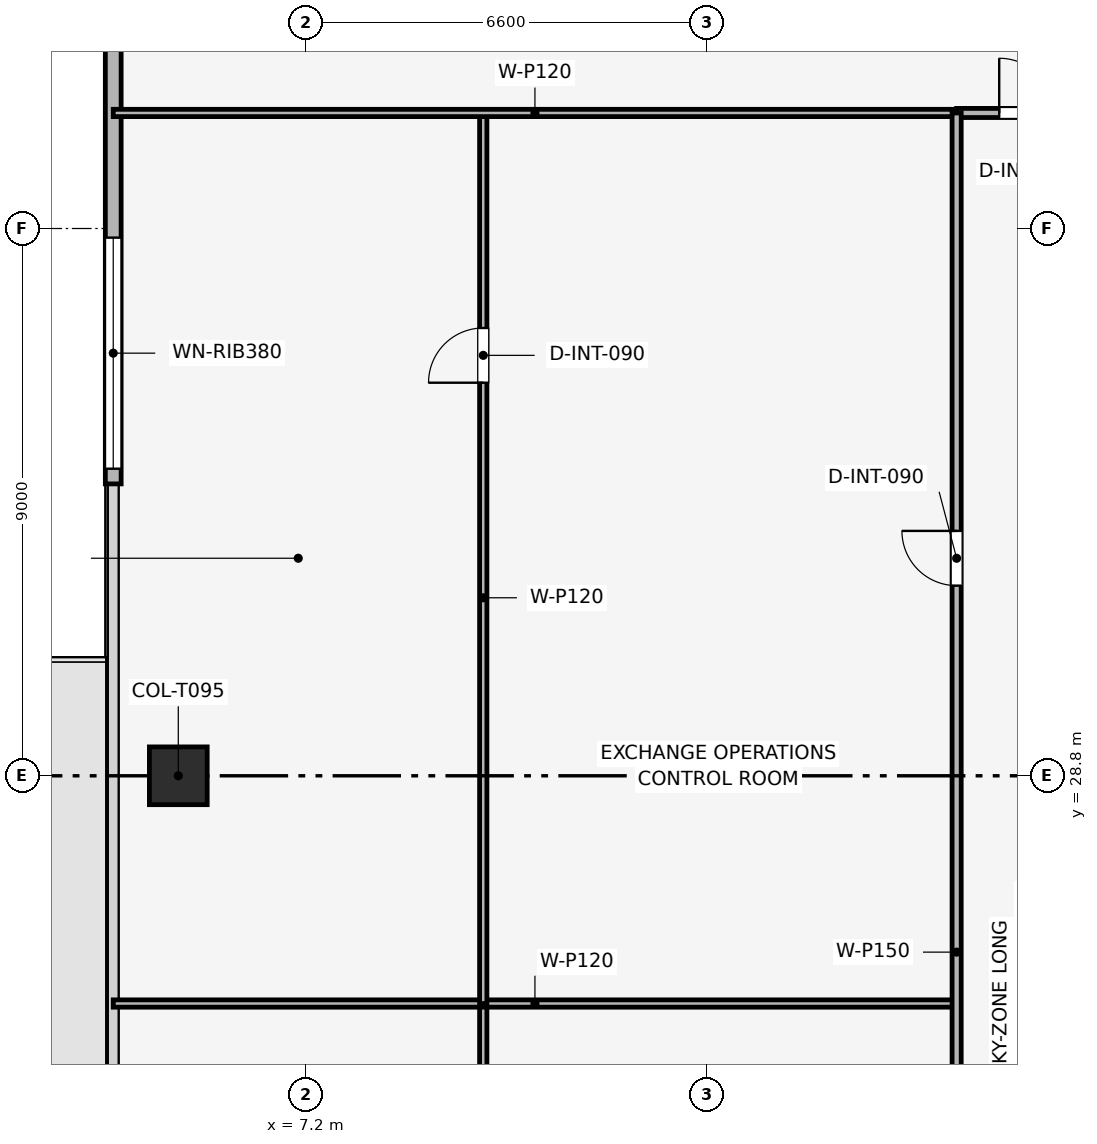
"""IFC4 building model, lengths in metres.
Left out: names, types, materials, properties, quantities, classifications, styles, units other than length and angle.
Written with IfcOpenShell. Run it as: python <this file> out.ifc"""

import sys

from ifc_helpers import new_model, si_unit, direction, frame, frame_2d, origin, origin_2d, place, context, subcontext, project, spatial, rectangle, extrude, element, fill, save


model = new_model("IFC4")
c1 = context("Model", 3, precision=1e-05, world=origin(), true_north=direction((0.0, 1.0)))
c2 = subcontext(c1, "Body", "Model", "MODEL_VIEW")
j1 = project(units=[si_unit("LENGTHUNIT", "METRE"), si_unit("PLANEANGLEUNIT", "RADIAN")], contexts=[c1])
p1 = place(None, origin())
s1 = spatial("IfcSite", under=j1, at=p1, CompositionType="ELEMENT")
p2 = place(p1, origin())
s2 = spatial("IfcBuilding", under=s1, at=p2, CompositionType="ELEMENT")
p3 = place(p2, frame((0.0, 0.0, 269.1)))
s3 = spatial("IfcBuildingStorey", under=s2, at=p3, CompositionType="ELEMENT", Elevation=269.1)
p4 = place(p3, frame((5.1, 28.8, 0.003), z_axis=(0.0, 0.0, 1.0), x_axis=(1.0, 0.0, 0.0)))
e1 = element("IfcColumn", 1, at=p4, inside=s3, PredefinedType="COLUMN", context=c2, shape_type="SweptSolid", body=[
    extrude(rectangle(XDim=0.95, YDim=0.95, at=origin_2d()), origin(), (0.0, 0.0, 1.0), 3.494),
])
p5 = place(p3, frame((4.03, 33.6, 0.0), z_axis=(0.0, 0.0, 1.0), x_axis=(0.0, 1.0, 0.0)))
e2 = element("IfcWall", 2, at=p5, inside=s3, PredefinedType="SOLIDWALL", context=c2, shape_type="SweptSolid", body=[
    extrude(rectangle(XDim=13.2, YDim=0.26, at=frame_2d((6.6, 0.0))), origin(), (0.0, 0.0, 1.0), 3.5),
])
p6 = place(p5, frame((0.25, 0.0, 0.9)))
e3 = element("IfcOpeningElement", 3, at=p6, cuts=e2, PredefinedType="OPENING", context=c2, shape_type="SweptSolid", body=[
    extrude(rectangle(XDim=3.8, YDim=1.9, at=frame_2d((1.9, 0.95))), frame((0.0, 0.14, 0.0), z_axis=(0.0, -1.0, 0.0), x_axis=(1.0, 0.0, 0.0)), (0.0, 0.0, 1.0), 0.28),
])
p7 = place(p3, frame((10.115, 13.1, 0.0), z_axis=(0.0, 0.0, 1.0), x_axis=(0.0, 1.0, 0.0)))
e4 = element("IfcWall", 4, at=p7, inside=s3, PredefinedType="PARTITIONING", context=c2, shape_type="SweptSolid", body=[
    extrude(rectangle(XDim=11.955, YDim=0.12, at=frame_2d((5.978, 0.0))), origin(), (0.0, 0.0, 1.0), 3.085),
])
p8 = place(p7, frame((8.191, 0.0, 0.0)))
e5 = element("IfcOpeningElement", 5, at=p8, cuts=e4, PredefinedType="OPENING", context=c2, shape_type="SweptSolid", body=[
    extrude(rectangle(XDim=0.9, YDim=2.1, at=frame_2d((0.45, 1.05))), frame((0.0, 0.07, 0.0), z_axis=(0.0, -1.0, 0.0), x_axis=(1.0, 0.0, 0.0)), (0.0, 0.0, 1.0), 0.14),
])
p9 = place(p3, frame((4.03, 25.055, 0.0), z_axis=(0.0, 0.0, 1.0), x_axis=(1.0, 0.0, 0.0)))
e6 = element("IfcWall", 6, at=p9, inside=s3, PredefinedType="PARTITIONING", context=c2, shape_type="SweptSolid", body=[
    extrude(rectangle(XDim=13.87, YDim=0.12, at=frame_2d((6.935, 0.0))), origin(), (0.0, 0.0, 1.0), 3.085),
])
p10 = place(p3, frame((10.115, 25.055, 0.0), z_axis=(0.0, 0.0, 1.0), x_axis=(0.0, 1.0, 0.0)))
e7 = element("IfcWall", 7, at=p10, inside=s3, PredefinedType="PARTITIONING", context=c2, shape_type="SweptSolid", body=[
    extrude(rectangle(XDim=14.645, YDim=0.12, at=frame_2d((7.323, 0.0))), origin(), (0.0, 0.0, 1.0), 3.085),
])
p11 = place(p10, frame((10.209, 0.0, 0.0)))
e8 = element("IfcOpeningElement", 8, at=p11, cuts=e7, PredefinedType="OPENING", context=c2, shape_type="SweptSolid", body=[
    extrude(rectangle(XDim=0.9, YDim=2.1, at=frame_2d((0.45, 1.05))), frame((0.0, 0.07, 0.0), z_axis=(0.0, -1.0, 0.0), x_axis=(1.0, 0.0, 0.0)), (0.0, 0.0, 1.0), 0.14),
])
p12 = place(p3, frame((4.03, 39.7, 0.0), z_axis=(0.0, 0.0, 1.0), x_axis=(1.0, 0.0, 0.0)))
e9 = element("IfcWall", 9, at=p12, inside=s3, PredefinedType="PARTITIONING", context=c2, shape_type="SweptSolid", body=[
    extrude(rectangle(XDim=13.87, YDim=0.12, at=frame_2d((6.935, 0.0))), origin(), (0.0, 0.0, 1.0), 3.085),
])
p13 = place(p3, frame((17.9, 39.7, 0.0), z_axis=(0.0, 0.0, 1.0), x_axis=(1.0, 0.0, 0.0)))
e10 = element("IfcWall", 10, at=p13, inside=s3, PredefinedType="PARTITIONING", context=c2, shape_type="SweptSolid", body=[
    extrude(rectangle(XDim=21.8, YDim=0.15, at=frame_2d((10.9, 0.0))), origin(), (0.0, 0.0, 1.0), 3.085),
])
p14 = place(p13, frame((0.7, 0.0, 0.0)))
e11 = element("IfcOpeningElement", 11, at=p14, cuts=e10, PredefinedType="OPENING", context=c2, shape_type="SweptSolid", body=[
    extrude(rectangle(XDim=0.9, YDim=2.1, at=frame_2d((0.45, 1.05))), frame((0.0, 0.085, 0.0), z_axis=(0.0, -1.0, 0.0), x_axis=(1.0, 0.0, 0.0)), (0.0, 0.0, 1.0), 0.17),
])
p15 = place(p13, frame((4.801, 0.0, 0.0)))
e12 = element("IfcOpeningElement", 12, at=p15, cuts=e10, PredefinedType="OPENING", context=c2, shape_type="SweptSolid", body=[
    extrude(rectangle(XDim=0.9, YDim=2.1, at=frame_2d((0.45, 1.05))), frame((0.0, 0.085, 0.0), z_axis=(0.0, -1.0, 0.0), x_axis=(1.0, 0.0, 0.0)), (0.0, 0.0, 1.0), 0.17),
])
p16 = place(p13, frame((10.535, 0.0, 0.0)))
e13 = element("IfcOpeningElement", 13, at=p16, cuts=e10, PredefinedType="OPENING", context=c2, shape_type="SweptSolid", body=[
    extrude(rectangle(XDim=0.9, YDim=2.1, at=frame_2d((0.45, 1.05))), frame((0.0, 0.085, 0.0), z_axis=(0.0, -1.0, 0.0), x_axis=(1.0, 0.0, 0.0)), (0.0, 0.0, 1.0), 0.17),
])
p17 = place(p13, frame((17.334, 0.0, 0.0)))
e14 = element("IfcOpeningElement", 14, at=p17, cuts=e10, PredefinedType="OPENING", context=c2, shape_type="SweptSolid", body=[
    extrude(rectangle(XDim=0.9, YDim=2.1, at=frame_2d((0.45, 1.05))), frame((0.0, 0.085, 0.0), z_axis=(0.0, -1.0, 0.0), x_axis=(1.0, 0.0, 0.0)), (0.0, 0.0, 1.0), 0.17),
])
p18 = place(p3, frame((17.9, 10.8, 0.0), z_axis=(0.0, 0.0, 1.0), x_axis=(0.0, 1.0, 0.0)))
e15 = element("IfcWall", 15, at=p18, inside=s3, PredefinedType="PARTITIONING", context=c2, shape_type="SweptSolid", body=[
    extrude(rectangle(XDim=28.9, YDim=0.15, at=frame_2d((14.45, 0.0))), origin(), (0.0, 0.0, 1.0), 3.085),
])
p19 = place(p18, frame((0.7, 0.0, 0.0)))
e16 = element("IfcOpeningElement", 16, at=p19, cuts=e15, PredefinedType="OPENING", context=c2, shape_type="SweptSolid", body=[
    extrude(rectangle(XDim=0.9, YDim=2.1, at=frame_2d((0.45, 1.05))), frame((0.0, 0.085, 0.0), z_axis=(0.0, -1.0, 0.0), x_axis=(1.0, 0.0, 0.0)), (0.0, 0.0, 1.0), 0.17),
])
p20 = place(p18, frame((7.828, 0.0, 0.0)))
e17 = element("IfcOpeningElement", 17, at=p20, cuts=e15, PredefinedType="OPENING", context=c2, shape_type="SweptSolid", body=[
    extrude(rectangle(XDim=0.9, YDim=2.1, at=frame_2d((0.45, 1.05))), frame((0.0, 0.085, 0.0), z_axis=(0.0, -1.0, 0.0), x_axis=(1.0, 0.0, 0.0)), (0.0, 0.0, 1.0), 0.17),
])
p21 = place(p18, frame((21.127, 0.0, 0.0)))
e18 = element("IfcOpeningElement", 18, at=p21, cuts=e15, PredefinedType="OPENING", context=c2, shape_type="SweptSolid", body=[
    extrude(rectangle(XDim=0.9, YDim=2.1, at=frame_2d((0.45, 1.05))), frame((0.0, 0.085, 0.0), z_axis=(0.0, -1.0, 0.0), x_axis=(1.0, 0.0, 0.0)), (0.0, 0.0, 1.0), 0.17),
])
p22 = place(p6, origin())
e19 = element("IfcWindow", 19, at=p22, inside=s3, PartitioningType="SINGLE_PANEL", PredefinedType="WINDOW", context=c2, shape_type="SweptSolid", body=[
    extrude(rectangle(XDim=3.8, YDim=1.9, at=frame_2d((1.9, 0.95))), frame((0.0, 0.03, 0.0), z_axis=(0.0, -1.0, 0.0), x_axis=(1.0, 0.0, 0.0)), (0.0, 0.0, 1.0), 0.06),
])
fill(e3, e19)
p23 = place(p11, origin())
e20 = element("IfcDoor", 20, at=p23, inside=s3, OperationType="SINGLE_SWING_LEFT", PredefinedType="DOOR", context=c2, shape_type="SweptSolid", body=[
    extrude(rectangle(XDim=0.9, YDim=2.1, at=frame_2d((0.45, 1.05))), frame((0.0, 0.025, 0.0), z_axis=(0.0, -1.0, 0.0), x_axis=(1.0, 0.0, 0.0)), (0.0, 0.0, 1.0), 0.05),
])
fill(e8, e20)
p24 = place(p14, origin())
e21 = element("IfcDoor", 21, at=p24, inside=s3, OperationType="SINGLE_SWING_LEFT", PredefinedType="DOOR", context=c2, shape_type="SweptSolid", body=[
    extrude(rectangle(XDim=0.9, YDim=2.1, at=frame_2d((0.45, 1.05))), frame((0.0, 0.025, 0.0), z_axis=(0.0, -1.0, 0.0), x_axis=(1.0, 0.0, 0.0)), (0.0, 0.0, 1.0), 0.05),
])
fill(e11, e21)
p25 = place(p21, origin())
e22 = element("IfcDoor", 22, at=p25, inside=s3, OperationType="SINGLE_SWING_RIGHT", PredefinedType="DOOR", context=c2, shape_type="SweptSolid", body=[
    extrude(rectangle(XDim=0.9, YDim=2.1, at=frame_2d((0.45, 1.05))), frame((0.0, 0.025, 0.0), z_axis=(0.0, -1.0, 0.0), x_axis=(1.0, 0.0, 0.0)), (0.0, 0.0, 1.0), 0.05),
])
fill(e18, e22)
save(model, sys.argv[1])
